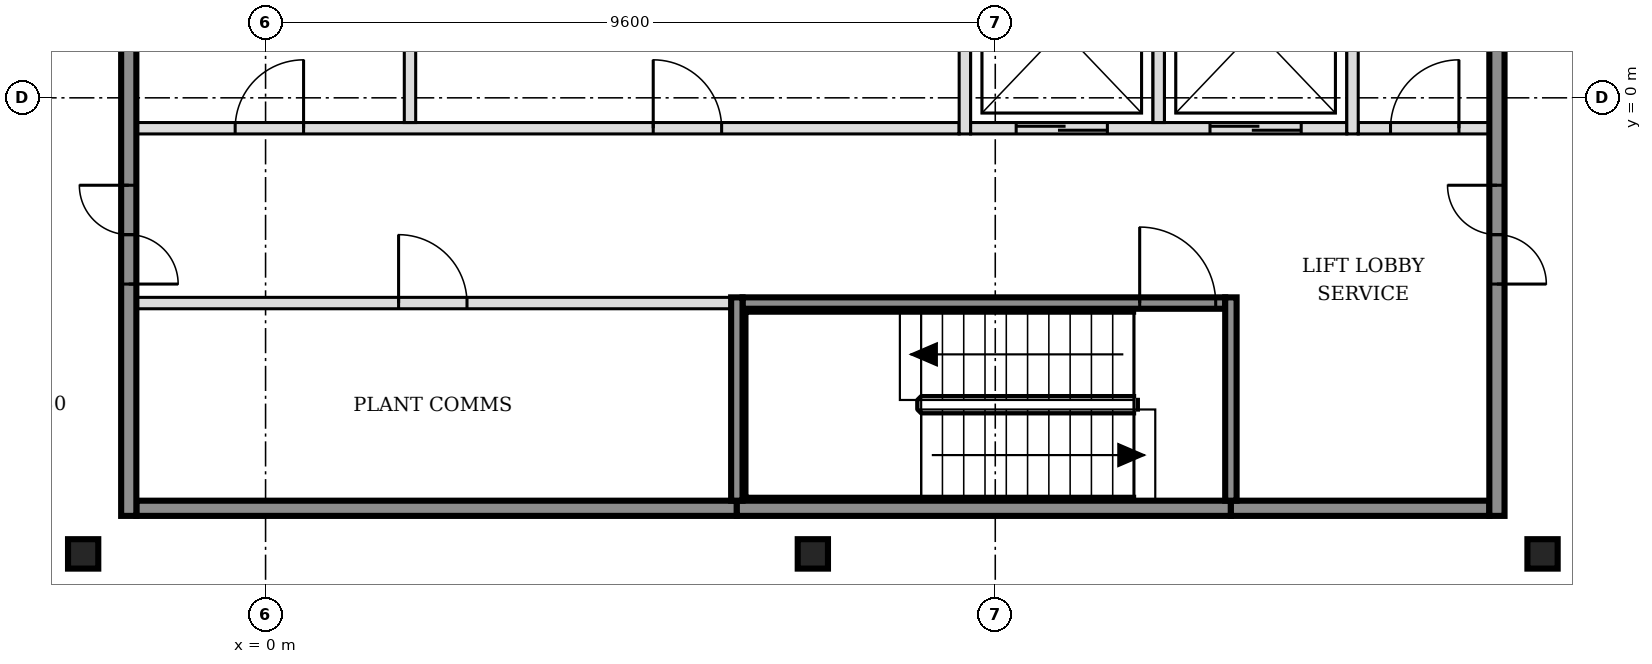
"""IFC4 building model, lengths in metres.
Left out: names, types, materials, properties, quantities, classifications, styles, units other than length and angle.
Written with IfcOpenShell. Run it as: python <this file> out.ifc"""

import sys

from ifc_helpers import new_model, si_unit, direction, frame, frame_2d, origin, origin_2d, place, context, subcontext, project, spatial, rectangle, i_section, extrude, element, fill, save


model = new_model("IFC4")
c1 = context("Model", 3, precision=1e-05, world=origin(), true_north=direction((0.0, 1.0)))
c2 = subcontext(c1, "Body", "Model", "MODEL_VIEW")
j1 = project(units=[si_unit("LENGTHUNIT", "METRE"), si_unit("PLANEANGLEUNIT", "RADIAN")], contexts=[c1])
p1 = place(None, origin())
s1 = spatial("IfcSite", under=j1, at=p1, CompositionType="ELEMENT")
p2 = place(p1, origin())
s2 = spatial("IfcBuilding", under=s1, at=p2, CompositionType="ELEMENT")
p3 = place(p2, frame((0.0, 0.0, 257.4)))
s3 = spatial("IfcBuildingStorey", under=s2, at=p3, CompositionType="ELEMENT", Elevation=257.4)
for number, where, z_axis, x_axis in (
    (1, (-2.4, -6.0, -0.15), (0.0, 0.0, 1.0), (1.0, 0.0, 0.0)),
    (2, (7.2, -6.0, -0.15), (0.0, 0.0, 1.0), (1.0, 0.0, 0.0)),
    (3, (16.8, -6.0, -0.15), (0.0, 0.0, 1.0), (1.0, 0.0, 0.0)),
):
    element("IfcColumn", number, at=place(p3, frame(where, z_axis=z_axis, x_axis=x_axis)), inside=s3, PredefinedType="COLUMN", context=c2, shape_type="SweptSolid", body=[
        extrude(i_section(OverallWidth=0.398, OverallDepth=0.387, WebThickness=0.021, FlangeThickness=0.033, FilletRadius=0.015, at=origin_2d()), origin(), (0.0, 0.0, 1.0), 3.5),
    ])
p4 = place(p3, frame((-1.7, -5.4, 0.0), z_axis=(0.0, 0.0, 1.0), x_axis=(1.0, 0.0, 0.0)))
e4 = element("IfcWall", 4, at=p4, inside=s3, PredefinedType="SOLIDWALL", context=c2, shape_type="SweptSolid", body=[
    extrude(rectangle(XDim=7.9, YDim=0.2, at=frame_2d((3.95, 0.0))), origin(), (0.0, 0.0, 1.0), 3.35),
])
p5 = place(p3, frame((6.2, -5.4, 0.0), z_axis=(0.0, 0.0, 1.0), x_axis=(1.0, 0.0, 0.0)))
e5 = element("IfcWall", 5, at=p5, inside=s3, PredefinedType="SOLIDWALL", context=c2, shape_type="SweptSolid", body=[
    extrude(rectangle(XDim=6.5, YDim=0.2, at=frame_2d((3.25, 0.0))), origin(), (0.0, 0.0, 1.0), 3.35),
])
p6 = place(p3, frame((12.7, -5.4, 0.0), z_axis=(0.0, 0.0, 1.0), x_axis=(1.0, 0.0, 0.0)))
e6 = element("IfcWall", 6, at=p6, inside=s3, PredefinedType="SOLIDWALL", context=c2, shape_type="SweptSolid", body=[
    extrude(rectangle(XDim=3.4, YDim=0.2, at=frame_2d((1.7, 0.0))), origin(), (0.0, 0.0, 1.0), 3.35),
])
p7 = place(p3, frame((-1.7, -2.7, 0.0), z_axis=(0.0, 0.0, 1.0), x_axis=(1.0, 0.0, 0.0)))
e7 = element("IfcWall", 7, at=p7, inside=s3, PredefinedType="PARTITIONING", context=c2, shape_type="SweptSolid", body=[
    extrude(rectangle(XDim=7.825, YDim=0.15, at=frame_2d((3.913, 0.0))), origin(), (0.0, 0.0, 1.0), 3.35),
])
p8 = place(p7, frame((3.45, 0.0, 0.0)))
e8 = element("IfcOpeningElement", 8, at=p8, cuts=e7, PredefinedType="OPENING", context=c2, shape_type="SweptSolid", body=[
    extrude(rectangle(XDim=0.9, YDim=2.1, at=frame_2d((0.45, 1.05))), frame((0.0, 0.085, 0.0), z_axis=(0.0, -1.0, 0.0), x_axis=(1.0, 0.0, 0.0)), (0.0, 0.0, 1.0), 0.17),
])
p9 = place(p3, frame((6.275, -2.7, 0.0), z_axis=(0.0, 0.0, 1.0), x_axis=(1.0, 0.0, 0.0)))
e9 = element("IfcWall", 9, at=p9, inside=s3, PredefinedType="SOLIDWALL", context=c2, shape_type="SweptSolid", body=[
    extrude(rectangle(XDim=6.35, YDim=0.15, at=frame_2d((3.175, 0.0))), origin(), (0.0, 0.0, 1.0), 3.35),
])
p10 = place(p9, frame((5.225, 0.0, 0.0)))
e10 = element("IfcOpeningElement", 10, at=p10, cuts=e9, PredefinedType="OPENING", context=c2, shape_type="SweptSolid", body=[
    extrude(rectangle(XDim=1.0, YDim=2.1, at=frame_2d((0.5, 1.05))), frame((0.0, 0.085, 0.0), z_axis=(0.0, -1.0, 0.0), x_axis=(1.0, 0.0, 0.0)), (0.0, 0.0, 1.0), 0.17),
])
p11 = place(p3, frame((-1.7, -0.4, 0.0), z_axis=(0.0, 0.0, 1.0), x_axis=(1.0, 0.0, 0.0)))
e11 = element("IfcWall", 11, at=p11, inside=s3, PredefinedType="PARTITIONING", context=c2, shape_type="SweptSolid", body=[
    extrude(rectangle(XDim=10.825, YDim=0.15, at=frame_2d((5.413, 0.0))), origin(), (0.0, 0.0, 1.0), 3.35),
])
p12 = place(p11, frame((1.3, 0.0, 0.0)))
e12 = element("IfcOpeningElement", 12, at=p12, cuts=e11, PredefinedType="OPENING", context=c2, shape_type="SweptSolid", body=[
    extrude(rectangle(XDim=0.9, YDim=2.1, at=frame_2d((0.45, 1.05))), frame((0.0, 0.085, 0.0), z_axis=(0.0, -1.0, 0.0), x_axis=(1.0, 0.0, 0.0)), (0.0, 0.0, 1.0), 0.17),
])
p13 = place(p11, frame((6.8, 0.0, 0.0)))
e13 = element("IfcOpeningElement", 13, at=p13, cuts=e11, PredefinedType="OPENING", context=c2, shape_type="SweptSolid", body=[
    extrude(rectangle(XDim=0.9, YDim=2.1, at=frame_2d((0.45, 1.05))), frame((0.0, 0.085, 0.0), z_axis=(0.0, -1.0, 0.0), x_axis=(1.0, 0.0, 0.0)), (0.0, 0.0, 1.0), 0.17),
])
p14 = place(p3, frame((9.275, -0.4, 0.0), z_axis=(0.0, 0.0, 1.0), x_axis=(1.0, 0.0, 0.0)))
e14 = element("IfcWall", 14, at=p14, inside=s3, PredefinedType="SOLIDWALL", context=c2, shape_type="SweptSolid", body=[
    extrude(rectangle(XDim=4.95, YDim=0.15, at=frame_2d((2.475, 0.0))), origin(), (0.0, 0.0, 1.0), 3.35),
])
p15 = place(p14, frame((0.6, 0.0, 0.0)))
e15 = element("IfcOpeningElement", 15, at=p15, cuts=e14, PredefinedType="OPENING", context=c2, shape_type="SweptSolid", body=[
    extrude(rectangle(XDim=1.2, YDim=2.1, at=frame_2d((0.6, 1.05))), frame((0.0, 0.085, 0.0), z_axis=(0.0, -1.0, 0.0), x_axis=(1.0, 0.0, 0.0)), (0.0, 0.0, 1.0), 0.17),
])
p16 = place(p14, frame((3.15, 0.0, 0.0)))
e16 = element("IfcOpeningElement", 16, at=p16, cuts=e14, PredefinedType="OPENING", context=c2, shape_type="SweptSolid", body=[
    extrude(rectangle(XDim=1.2, YDim=2.1, at=frame_2d((0.6, 1.05))), frame((0.0, 0.085, 0.0), z_axis=(0.0, -1.0, 0.0), x_axis=(1.0, 0.0, 0.0)), (0.0, 0.0, 1.0), 0.17),
])
p17 = place(p3, frame((14.375, -0.4, 0.0), z_axis=(0.0, 0.0, 1.0), x_axis=(1.0, 0.0, 0.0)))
e17 = element("IfcWall", 17, at=p17, inside=s3, PredefinedType="PARTITIONING", context=c2, shape_type="SweptSolid", body=[
    extrude(rectangle(XDim=1.725, YDim=0.15, at=frame_2d((0.863, 0.0))), origin(), (0.0, 0.0, 1.0), 3.35),
])
p18 = place(p17, frame((0.425, 0.0, 0.0)))
e18 = element("IfcOpeningElement", 18, at=p18, cuts=e17, PredefinedType="OPENING", context=c2, shape_type="SweptSolid", body=[
    extrude(rectangle(XDim=0.9, YDim=2.1, at=frame_2d((0.45, 1.05))), frame((0.0, 0.085, 0.0), z_axis=(0.0, -1.0, 0.0), x_axis=(1.0, 0.0, 0.0)), (0.0, 0.0, 1.0), 0.17),
])
p19 = place(p3, frame((-1.8, -5.5, 0.0), z_axis=(0.0, 0.0, 1.0), x_axis=(0.0, 1.0, 0.0)))
e19 = element("IfcWall", 19, at=p19, inside=s3, PredefinedType="SOLIDWALL", context=c2, shape_type="SweptSolid", body=[
    extrude(rectangle(XDim=15.8, YDim=0.2, at=frame_2d((7.9, 0.0))), origin(), (0.0, 0.0, 1.0), 3.35),
])
p20 = place(p19, frame((3.05, 0.0, 0.0)))
e20 = element("IfcOpeningElement", 20, at=p20, cuts=e19, PredefinedType="OPENING", context=c2, shape_type="SweptSolid", body=[
    extrude(rectangle(XDim=1.3, YDim=2.1, at=frame_2d((0.65, 1.05))), frame((0.0, 0.11, 0.0), z_axis=(0.0, -1.0, 0.0), x_axis=(1.0, 0.0, 0.0)), (0.0, 0.0, 1.0), 0.22),
])
p21 = place(p19, frame((11.45, 0.0, 0.0)))
e21 = element("IfcOpeningElement", 21, at=p21, cuts=e19, PredefinedType="OPENING", context=c2, shape_type="SweptSolid", body=[
    extrude(rectangle(XDim=1.3, YDim=2.1, at=frame_2d((0.65, 1.05))), frame((0.0, 0.11, 0.0), z_axis=(0.0, -1.0, 0.0), x_axis=(1.0, 0.0, 0.0)), (0.0, 0.0, 1.0), 0.22),
])
p22 = place(p3, frame((1.9, -0.325, 0.0), z_axis=(0.0, 0.0, 1.0), x_axis=(0.0, 1.0, 0.0)))
e22 = element("IfcWall", 22, at=p22, inside=s3, PredefinedType="PARTITIONING", context=c2, shape_type="SweptSolid", body=[
    extrude(rectangle(XDim=2.45, YDim=0.15, at=frame_2d((1.225, 0.0))), origin(), (0.0, 0.0, 1.0), 3.35),
])
p23 = place(p3, frame((6.2, -5.3, 0.0), z_axis=(0.0, 0.0, 1.0), x_axis=(0.0, 1.0, 0.0)))
e23 = element("IfcWall", 23, at=p23, inside=s3, PredefinedType="SOLIDWALL", context=c2, shape_type="SweptSolid", body=[
    extrude(rectangle(XDim=2.675, YDim=0.15, at=frame_2d((1.337, 0.0))), origin(), (0.0, 0.0, 1.0), 3.35),
])
p24 = place(p3, frame((9.2, -0.475, 0.0), z_axis=(0.0, 0.0, 1.0), x_axis=(0.0, 1.0, 0.0)))
e24 = element("IfcWall", 24, at=p24, inside=s3, PredefinedType="SOLIDWALL", context=c2, shape_type="SweptSolid", body=[
    extrude(rectangle(XDim=2.6, YDim=0.15, at=frame_2d((1.3, 0.0))), origin(), (0.0, 0.0, 1.0), 3.35),
])
p25 = place(p3, frame((11.75, -0.325, 0.0), z_axis=(0.0, 0.0, 1.0), x_axis=(0.0, 1.0, 0.0)))
e25 = element("IfcWall", 25, at=p25, inside=s3, PredefinedType="SOLIDWALL", context=c2, shape_type="SweptSolid", body=[
    extrude(rectangle(XDim=2.45, YDim=0.15, at=frame_2d((1.225, 0.0))), origin(), (0.0, 0.0, 1.0), 3.35),
])
p26 = place(p3, frame((12.7, -5.3, 0.0), z_axis=(0.0, 0.0, 1.0), x_axis=(0.0, 1.0, 0.0)))
e26 = element("IfcWall", 26, at=p26, inside=s3, PredefinedType="SOLIDWALL", context=c2, shape_type="SweptSolid", body=[
    extrude(rectangle(XDim=2.675, YDim=0.15, at=frame_2d((1.337, 0.0))), origin(), (0.0, 0.0, 1.0), 3.35),
])
p27 = place(p3, frame((14.3, -0.475, 0.0), z_axis=(0.0, 0.0, 1.0), x_axis=(0.0, 1.0, 0.0)))
e27 = element("IfcWall", 27, at=p27, inside=s3, PredefinedType="SOLIDWALL", context=c2, shape_type="SweptSolid", body=[
    extrude(rectangle(XDim=2.75, YDim=0.15, at=frame_2d((1.375, 0.0))), origin(), (0.0, 0.0, 1.0), 3.35),
])
p28 = place(p3, frame((16.2, -5.5, 0.0), z_axis=(0.0, 0.0, 1.0), x_axis=(0.0, 1.0, 0.0)))
e28 = element("IfcWall", 28, at=p28, inside=s3, PredefinedType="SOLIDWALL", context=c2, shape_type="SweptSolid", body=[
    extrude(rectangle(XDim=15.8, YDim=0.2, at=frame_2d((7.9, 0.0))), origin(), (0.0, 0.0, 1.0), 3.35),
])
p29 = place(p28, frame((3.05, 0.0, 0.0)))
e29 = element("IfcOpeningElement", 29, at=p29, cuts=e28, PredefinedType="OPENING", context=c2, shape_type="SweptSolid", body=[
    extrude(rectangle(XDim=1.3, YDim=2.1, at=frame_2d((0.65, 1.05))), frame((0.0, 0.11, 0.0), z_axis=(0.0, -1.0, 0.0), x_axis=(1.0, 0.0, 0.0)), (0.0, 0.0, 1.0), 0.22),
])
p30 = place(p28, frame((11.45, 0.0, 0.0)))
e30 = element("IfcOpeningElement", 30, at=p30, cuts=e28, PredefinedType="OPENING", context=c2, shape_type="SweptSolid", body=[
    extrude(rectangle(XDim=1.3, YDim=2.1, at=frame_2d((0.65, 1.05))), frame((0.0, 0.11, 0.0), z_axis=(0.0, -1.0, 0.0), x_axis=(1.0, 0.0, 0.0)), (0.0, 0.0, 1.0), 0.22),
])
p31 = place(p15, origin())
e31 = element("IfcDoor", 31, at=p31, inside=s3, OperationType="DOUBLE_DOOR_SLIDING", PredefinedType="DOOR", context=c2, shape_type="SweptSolid", body=[
    extrude(rectangle(XDim=1.2, YDim=2.1, at=frame_2d((0.6, 1.05))), frame((0.0, 0.025, 0.0), z_axis=(0.0, -1.0, 0.0), x_axis=(1.0, 0.0, 0.0)), (0.0, 0.0, 1.0), 0.05),
])
fill(e15, e31)
p32 = place(p16, origin())
e32 = element("IfcDoor", 32, at=p32, inside=s3, OperationType="DOUBLE_DOOR_SLIDING", PredefinedType="DOOR", context=c2, shape_type="SweptSolid", body=[
    extrude(rectangle(XDim=1.2, YDim=2.1, at=frame_2d((0.6, 1.05))), frame((0.0, 0.025, 0.0), z_axis=(0.0, -1.0, 0.0), x_axis=(1.0, 0.0, 0.0)), (0.0, 0.0, 1.0), 0.05),
])
fill(e16, e32)
p33 = place(p10, origin())
e33 = element("IfcDoor", 33, at=p33, inside=s3, OperationType="SINGLE_SWING_LEFT", PredefinedType="DOOR", context=c2, shape_type="SweptSolid", body=[
    extrude(rectangle(XDim=1.0, YDim=2.1, at=frame_2d((0.5, 1.05))), frame((0.0, 0.025, 0.0), z_axis=(0.0, -1.0, 0.0), x_axis=(1.0, 0.0, 0.0)), (0.0, 0.0, 1.0), 0.05),
])
fill(e10, e33)
p34 = place(p20, origin())
e34 = element("IfcDoor", 34, at=p34, inside=s3, OperationType="DOUBLE_DOOR_SINGLE_SWING", PredefinedType="DOOR", context=c2, shape_type="SweptSolid", body=[
    extrude(rectangle(XDim=1.3, YDim=2.1, at=frame_2d((0.65, 1.05))), frame((0.0, 0.025, 0.0), z_axis=(0.0, -1.0, 0.0), x_axis=(1.0, 0.0, 0.0)), (0.0, 0.0, 1.0), 0.05),
])
fill(e20, e34)
p35 = place(p29, origin())
e35 = element("IfcDoor", 35, at=p35, inside=s3, OperationType="DOUBLE_DOOR_SINGLE_SWING", PredefinedType="DOOR", context=c2, shape_type="SweptSolid", body=[
    extrude(rectangle(XDim=1.3, YDim=2.1, at=frame_2d((0.65, 1.05))), frame((0.0, 0.025, 0.0), z_axis=(0.0, -1.0, 0.0), x_axis=(1.0, 0.0, 0.0)), (0.0, 0.0, 1.0), 0.05),
])
fill(e29, e35)
p36 = place(p18, origin())
e36 = element("IfcDoor", 36, at=p36, inside=s3, OperationType="SINGLE_SWING_RIGHT", PredefinedType="DOOR", context=c2, shape_type="SweptSolid", body=[
    extrude(rectangle(XDim=0.9, YDim=2.1, at=frame_2d((0.45, 1.05))), frame((0.0, 0.025, 0.0), z_axis=(0.0, -1.0, 0.0), x_axis=(1.0, 0.0, 0.0)), (0.0, 0.0, 1.0), 0.05),
])
fill(e18, e36)
p37 = place(p8, origin())
e37 = element("IfcDoor", 37, at=p37, inside=s3, OperationType="SINGLE_SWING_LEFT", PredefinedType="DOOR", context=c2, shape_type="SweptSolid", body=[
    extrude(rectangle(XDim=0.9, YDim=2.1, at=frame_2d((0.45, 1.05))), frame((0.0, 0.025, 0.0), z_axis=(0.0, -1.0, 0.0), x_axis=(1.0, 0.0, 0.0)), (0.0, 0.0, 1.0), 0.05),
])
fill(e8, e37)
p38 = place(p12, origin())
e38 = element("IfcDoor", 38, at=p38, inside=s3, OperationType="SINGLE_SWING_RIGHT", PredefinedType="DOOR", context=c2, shape_type="SweptSolid", body=[
    extrude(rectangle(XDim=0.9, YDim=2.1, at=frame_2d((0.45, 1.05))), frame((0.0, 0.025, 0.0), z_axis=(0.0, -1.0, 0.0), x_axis=(1.0, 0.0, 0.0)), (0.0, 0.0, 1.0), 0.05),
])
fill(e12, e38)
p39 = place(p13, origin())
e39 = element("IfcDoor", 39, at=p39, inside=s3, OperationType="SINGLE_SWING_LEFT", PredefinedType="DOOR", context=c2, shape_type="SweptSolid", body=[
    extrude(rectangle(XDim=0.9, YDim=2.1, at=frame_2d((0.45, 1.05))), frame((0.0, 0.025, 0.0), z_axis=(0.0, -1.0, 0.0), x_axis=(1.0, 0.0, 0.0)), (0.0, 0.0, 1.0), 0.05),
])
fill(e13, e39)
save(model, sys.argv[1])
